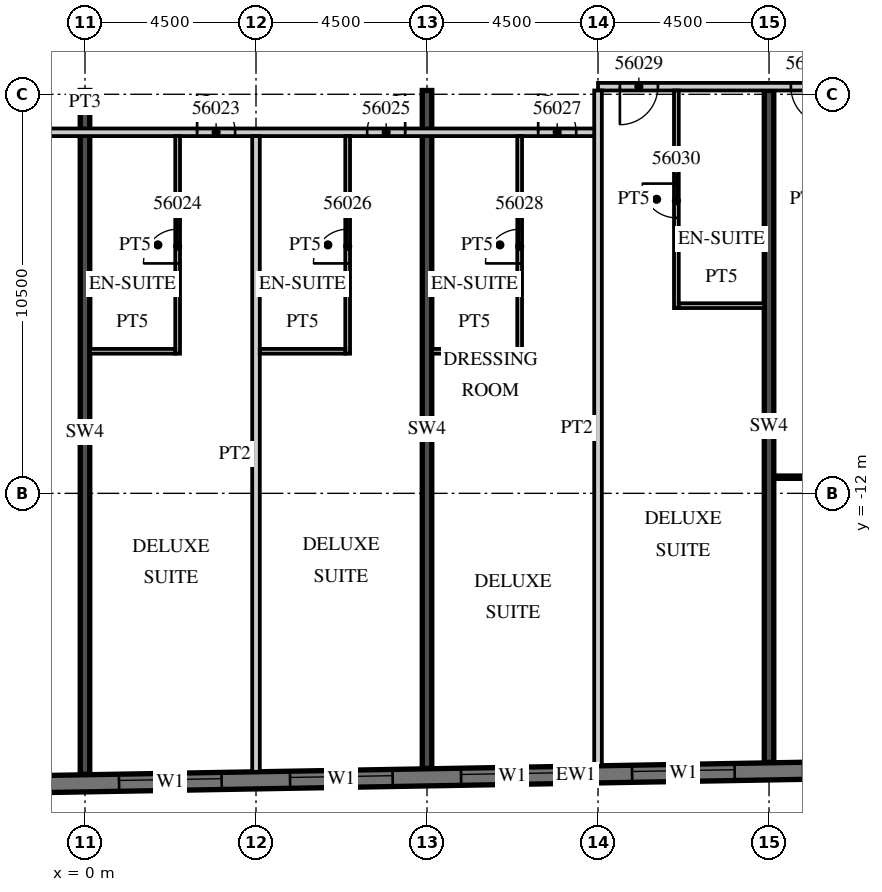
"""IFC4 building model, lengths in metres.
Left out: names, types, materials, properties, quantities, classifications, styles, units other than length and angle.
Written with IfcOpenShell. Run it as: python <this file> out.ifc"""

import sys

from ifc_helpers import new_model, si_unit, direction, frame, frame_2d, origin, place, context, subcontext, project, spatial, rectangle, extrude, element, fill, save


model = new_model("IFC4")
c1 = context("Model", 3, precision=1e-05, world=origin(), true_north=direction((0.0, 1.0)))
c2 = subcontext(c1, "Body", "Model", "MODEL_VIEW")
j1 = project(units=[si_unit("LENGTHUNIT", "METRE"), si_unit("PLANEANGLEUNIT", "RADIAN")], contexts=[c1])
p1 = place(None, origin())
s1 = spatial("IfcSite", under=j1, at=p1, CompositionType="ELEMENT")
p2 = place(p1, origin())
s2 = spatial("IfcBuilding", under=s1, at=p2, CompositionType="ELEMENT")
p3 = place(p2, frame((0.0, 0.0, 230.9)))
s3 = spatial("IfcBuildingStorey", under=s2, at=p3, CompositionType="ELEMENT", Elevation=230.9)
p4 = place(p3, frame((0.0, -19.393, 0.0), z_axis=(0.0, 0.0, 1.0), x_axis=(0.0, 1.0, 0.0)))
e1 = element("IfcWall", 1, at=p4, inside=s3, PredefinedType="SHEAR", context=c2, shape_type="SweptSolid", body=[
    extrude(rectangle(XDim=17.993, YDim=0.25, at=frame_2d((8.997, 0.0))), origin(), (0.0, 0.0, 1.0), 3.3),
])
p5 = place(p3, frame((9.0, -19.236, 0.0), z_axis=(0.0, 0.0, 1.0), x_axis=(0.0, 1.0, 0.0)))
e2 = element("IfcWall", 2, at=p5, inside=s3, PredefinedType="SHEAR", context=c2, shape_type="SweptSolid", body=[
    extrude(rectangle(XDim=17.836, YDim=0.25, at=frame_2d((8.918, 0.0))), origin(), (0.0, 0.0, 1.0), 3.3),
])
p6 = place(p3, frame((18.0, -19.079, 0.0), z_axis=(0.0, 0.0, 1.0), x_axis=(0.0, 1.0, 0.0)))
e3 = element("IfcWall", 3, at=p6, inside=s3, PredefinedType="SHEAR", context=c2, shape_type="SweptSolid", body=[
    extrude(rectangle(XDim=17.679, YDim=0.25, at=frame_2d((8.84, 0.0))), origin(), (0.0, 0.0, 1.0), 3.3),
])
p7 = place(p3, frame((-13.504, -19.866, 0.0), z_axis=(0.0, 0.0, 1.0), x_axis=(0.999847672978, 0.017453676992, 0.0)))
e4 = element("IfcWall", 4, at=p7, inside=s3, PredefinedType="SOLIDWALL", context=c2, shape_type="SweptSolid", body=[
    extrude(rectangle(XDim=52.86, YDim=0.45, at=frame_2d((26.43, 0.0))), origin(), (0.0, 0.0, 1.0), 3.02),
])
p8 = place(p7, frame((0.9, 0.0, 0.45)))
e5 = element("IfcOpeningElement", 5, at=p8, cuts=e4, PredefinedType="OPENING", context=c2, shape_type="SweptSolid", body=[
    extrude(rectangle(XDim=2.7, YDim=2.25, at=frame_2d((1.35, 1.125))), frame((0.0, 0.235, 0.0), z_axis=(0.0, -1.0, 0.0), x_axis=(1.0, 0.0, 0.0)), (0.0, 0.0, 1.0), 0.47),
])
p9 = place(p7, frame((5.401, 0.0, 0.45)))
e6 = element("IfcOpeningElement", 6, at=p9, cuts=e4, PredefinedType="OPENING", context=c2, shape_type="SweptSolid", body=[
    extrude(rectangle(XDim=2.7, YDim=2.25, at=frame_2d((1.35, 1.125))), frame((0.0, 0.235, 0.0), z_axis=(0.0, -1.0, 0.0), x_axis=(1.0, 0.0, 0.0)), (0.0, 0.0, 1.0), 0.47),
])
p10 = place(p7, frame((9.902, 0.0, 0.45)))
e7 = element("IfcOpeningElement", 7, at=p10, cuts=e4, PredefinedType="OPENING", context=c2, shape_type="SweptSolid", body=[
    extrude(rectangle(XDim=2.7, YDim=2.25, at=frame_2d((1.35, 1.125))), frame((0.0, 0.235, 0.0), z_axis=(0.0, -1.0, 0.0), x_axis=(1.0, 0.0, 0.0)), (0.0, 0.0, 1.0), 0.47),
])
p11 = place(p7, frame((14.402, 0.0, 0.45)))
e8 = element("IfcOpeningElement", 8, at=p11, cuts=e4, PredefinedType="OPENING", context=c2, shape_type="SweptSolid", body=[
    extrude(rectangle(XDim=2.7, YDim=2.25, at=frame_2d((1.35, 1.125))), frame((0.0, 0.235, 0.0), z_axis=(0.0, -1.0, 0.0), x_axis=(1.0, 0.0, 0.0)), (0.0, 0.0, 1.0), 0.47),
])
p12 = place(p7, frame((18.903, 0.0, 0.45)))
e9 = element("IfcOpeningElement", 9, at=p12, cuts=e4, PredefinedType="OPENING", context=c2, shape_type="SweptSolid", body=[
    extrude(rectangle(XDim=2.7, YDim=2.25, at=frame_2d((1.35, 1.125))), frame((0.0, 0.235, 0.0), z_axis=(0.0, -1.0, 0.0), x_axis=(1.0, 0.0, 0.0)), (0.0, 0.0, 1.0), 0.47),
])
p13 = place(p7, frame((23.404, 0.0, 0.45)))
e10 = element("IfcOpeningElement", 10, at=p13, cuts=e4, PredefinedType="OPENING", context=c2, shape_type="SweptSolid", body=[
    extrude(rectangle(XDim=2.7, YDim=2.25, at=frame_2d((1.35, 1.125))), frame((0.0, 0.235, 0.0), z_axis=(0.0, -1.0, 0.0), x_axis=(1.0, 0.0, 0.0)), (0.0, 0.0, 1.0), 0.47),
])
p14 = place(p7, frame((27.904, 0.0, 0.45)))
e11 = element("IfcOpeningElement", 11, at=p14, cuts=e4, PredefinedType="OPENING", context=c2, shape_type="SweptSolid", body=[
    extrude(rectangle(XDim=2.7, YDim=2.25, at=frame_2d((1.35, 1.125))), frame((0.0, 0.235, 0.0), z_axis=(0.0, -1.0, 0.0), x_axis=(1.0, 0.0, 0.0)), (0.0, 0.0, 1.0), 0.47),
])
p15 = place(p7, frame((32.405, 0.0, 0.45)))
e12 = element("IfcOpeningElement", 12, at=p15, cuts=e4, PredefinedType="OPENING", context=c2, shape_type="SweptSolid", body=[
    extrude(rectangle(XDim=2.7, YDim=2.25, at=frame_2d((1.35, 1.125))), frame((0.0, 0.235, 0.0), z_axis=(0.0, -1.0, 0.0), x_axis=(1.0, 0.0, 0.0)), (0.0, 0.0, 1.0), 0.47),
])
p16 = place(p7, frame((36.906, 0.0, 0.45)))
e13 = element("IfcOpeningElement", 13, at=p16, cuts=e4, PredefinedType="OPENING", context=c2, shape_type="SweptSolid", body=[
    extrude(rectangle(XDim=2.7, YDim=2.25, at=frame_2d((1.35, 1.125))), frame((0.0, 0.235, 0.0), z_axis=(0.0, -1.0, 0.0), x_axis=(1.0, 0.0, 0.0)), (0.0, 0.0, 1.0), 0.47),
])
p17 = place(p7, frame((41.406, 0.0, 0.45)))
e14 = element("IfcOpeningElement", 14, at=p17, cuts=e4, PredefinedType="OPENING", context=c2, shape_type="SweptSolid", body=[
    extrude(rectangle(XDim=2.7, YDim=2.25, at=frame_2d((1.35, 1.125))), frame((0.0, 0.235, 0.0), z_axis=(0.0, -1.0, 0.0), x_axis=(1.0, 0.0, 0.0)), (0.0, 0.0, 1.0), 0.47),
])
p18 = place(p7, frame((45.907, 0.0, 0.45)))
e15 = element("IfcOpeningElement", 15, at=p18, cuts=e4, PredefinedType="OPENING", context=c2, shape_type="SweptSolid", body=[
    extrude(rectangle(XDim=2.7, YDim=2.25, at=frame_2d((1.35, 1.125))), frame((0.0, 0.235, 0.0), z_axis=(0.0, -1.0, 0.0), x_axis=(1.0, 0.0, 0.0)), (0.0, 0.0, 1.0), 0.47),
])
p19 = place(p3, frame((-13.5, -2.5, 0.0), z_axis=(0.0, 0.0, 1.0), x_axis=(1.0, 0.0, 0.0)))
e16 = element("IfcWall", 16, at=p19, inside=s3, PredefinedType="PARTITIONING", context=c2, shape_type="SweptSolid", body=[
    extrude(rectangle(XDim=27.0, YDim=0.2, at=frame_2d((13.5, 0.0))), origin(), (0.0, 0.0, 1.0), 3.02),
])
p20 = place(p19, frame((2.925, 0.0, 0.0)))
e17 = element("IfcOpeningElement", 17, at=p20, cuts=e16, PredefinedType="OPENING", context=c2, shape_type="SweptSolid", body=[
    extrude(rectangle(XDim=1.0, YDim=2.1, at=frame_2d((0.5, 1.05))), frame((0.0, 0.11, 0.0), z_axis=(0.0, -1.0, 0.0), x_axis=(1.0, 0.0, 0.0)), (0.0, 0.0, 1.0), 0.22),
])
p21 = place(p19, frame((9.863, 0.0, 0.0)))
e18 = element("IfcOpeningElement", 18, at=p21, cuts=e16, PredefinedType="OPENING", context=c2, shape_type="SweptSolid", body=[
    extrude(rectangle(XDim=1.2, YDim=2.1, at=frame_2d((0.6, 1.05))), frame((0.0, 0.11, 0.0), z_axis=(0.0, -1.0, 0.0), x_axis=(1.0, 0.0, 0.0)), (0.0, 0.0, 1.0), 0.22),
])
p22 = place(p19, frame((16.45, 0.0, 0.0)))
e19 = element("IfcOpeningElement", 19, at=p22, cuts=e16, PredefinedType="OPENING", context=c2, shape_type="SweptSolid", body=[
    extrude(rectangle(XDim=1.0, YDim=2.1, at=frame_2d((0.5, 1.05))), frame((0.0, 0.11, 0.0), z_axis=(0.0, -1.0, 0.0), x_axis=(1.0, 0.0, 0.0)), (0.0, 0.0, 1.0), 0.22),
])
p23 = place(p19, frame((20.925, 0.0, 0.0)))
e20 = element("IfcOpeningElement", 20, at=p23, cuts=e16, PredefinedType="OPENING", context=c2, shape_type="SweptSolid", body=[
    extrude(rectangle(XDim=1.0, YDim=2.1, at=frame_2d((0.5, 1.05))), frame((0.0, 0.11, 0.0), z_axis=(0.0, -1.0, 0.0), x_axis=(1.0, 0.0, 0.0)), (0.0, 0.0, 1.0), 0.22),
])
p24 = place(p19, frame((25.425, 0.0, 0.0)))
e21 = element("IfcOpeningElement", 21, at=p24, cuts=e16, PredefinedType="OPENING", context=c2, shape_type="SweptSolid", body=[
    extrude(rectangle(XDim=1.0, YDim=2.1, at=frame_2d((0.5, 1.05))), frame((0.0, 0.11, 0.0), z_axis=(0.0, -1.0, 0.0), x_axis=(1.0, 0.0, 0.0)), (0.0, 0.0, 1.0), 0.22),
])
p25 = place(p3, frame((13.5, -1.3, 0.0), z_axis=(0.0, 0.0, 1.0), x_axis=(1.0, 0.0, 0.0)))
e22 = element("IfcWall", 22, at=p25, inside=s3, PredefinedType="PARTITIONING", context=c2, shape_type="SweptSolid", body=[
    extrude(rectangle(XDim=29.091, YDim=0.2, at=frame_2d((14.545, 0.0))), origin(), (0.0, 0.0, 1.0), 3.02),
])
p26 = place(p25, frame((0.575, 0.0, 0.0)))
e23 = element("IfcOpeningElement", 23, at=p26, cuts=e22, PredefinedType="OPENING", context=c2, shape_type="SweptSolid", body=[
    extrude(rectangle(XDim=1.0, YDim=2.1, at=frame_2d((0.5, 1.05))), frame((0.0, 0.11, 0.0), z_axis=(0.0, -1.0, 0.0), x_axis=(1.0, 0.0, 0.0)), (0.0, 0.0, 1.0), 0.22),
])
p27 = place(p25, frame((5.075, 0.0, 0.0)))
e24 = element("IfcOpeningElement", 24, at=p27, cuts=e22, PredefinedType="OPENING", context=c2, shape_type="SweptSolid", body=[
    extrude(rectangle(XDim=1.0, YDim=2.1, at=frame_2d((0.5, 1.05))), frame((0.0, 0.11, 0.0), z_axis=(0.0, -1.0, 0.0), x_axis=(1.0, 0.0, 0.0)), (0.0, 0.0, 1.0), 0.22),
])
p28 = place(p25, frame((9.55, 0.0, 0.0)))
e25 = element("IfcOpeningElement", 25, at=p28, cuts=e22, PredefinedType="OPENING", context=c2, shape_type="SweptSolid", body=[
    extrude(rectangle(XDim=1.0, YDim=2.1, at=frame_2d((0.5, 1.05))), frame((0.0, 0.11, 0.0), z_axis=(0.0, -1.0, 0.0), x_axis=(1.0, 0.0, 0.0)), (0.0, 0.0, 1.0), 0.22),
])
p29 = place(p25, frame((18.862, 0.0, 0.0)))
e26 = element("IfcOpeningElement", 26, at=p29, cuts=e22, PredefinedType="OPENING", context=c2, shape_type="SweptSolid", body=[
    extrude(rectangle(XDim=1.2, YDim=2.1, at=frame_2d((0.6, 1.05))), frame((0.0, 0.11, 0.0), z_axis=(0.0, -1.0, 0.0), x_axis=(1.0, 0.0, 0.0)), (0.0, 0.0, 1.0), 0.22),
])
p30 = place(p25, frame((23.075, 0.0, 0.0)))
e27 = element("IfcOpeningElement", 27, at=p30, cuts=e22, PredefinedType="OPENING", context=c2, shape_type="SweptSolid", body=[
    extrude(rectangle(XDim=1.0, YDim=2.1, at=frame_2d((0.5, 1.05))), frame((0.0, 0.11, 0.0), z_axis=(0.0, -1.0, 0.0), x_axis=(1.0, 0.0, 0.0)), (0.0, 0.0, 1.0), 0.22),
])
p31 = place(p25, frame((27.611, 0.0, 0.0)))
e28 = element("IfcOpeningElement", 28, at=p31, cuts=e22, PredefinedType="OPENING", context=c2, shape_type="SweptSolid", body=[
    extrude(rectangle(XDim=1.0, YDim=2.4, at=frame_2d((0.5, 1.2))), frame((0.0, 0.11, 0.0), z_axis=(0.0, -1.0, 0.0), x_axis=(1.0, 0.0, 0.0)), (0.0, 0.0, 1.0), 0.22),
])
p32 = place(p3, frame((4.5, -19.327, 0.0), z_axis=(0.0, 0.0, 1.0), x_axis=(0.0, 1.0, 0.0)))
e29 = element("IfcWall", 29, at=p32, inside=s3, PredefinedType="PARTITIONING", context=c2, shape_type="SweptSolid", body=[
    extrude(rectangle(XDim=16.727, YDim=0.2, at=frame_2d((8.363, 0.0))), origin(), (0.0, 0.0, 1.0), 3.02),
])
p33 = place(p3, frame((2.438, -8.325, 0.0), z_axis=(0.0, 0.0, 1.0), x_axis=(0.0, 1.0, 0.0)))
e30 = element("IfcWall", 30, at=p33, inside=s3, PredefinedType="PARTITIONING", context=c2, shape_type="SweptSolid", body=[
    extrude(rectangle(XDim=5.725, YDim=0.125, at=frame_2d((2.862, 0.0))), origin(), (0.0, 0.0, 1.0), 3.02),
])
p34 = place(p33, frame((2.375, 0.0, 0.0)))
e31 = element("IfcOpeningElement", 31, at=p34, cuts=e30, PredefinedType="OPENING", context=c2, shape_type="SweptSolid", body=[
    extrude(rectangle(XDim=0.9, YDim=2.1, at=frame_2d((0.45, 1.05))), frame((0.0, 0.073, 0.0), z_axis=(0.0, -1.0, 0.0), x_axis=(1.0, 0.0, 0.0)), (0.0, 0.0, 1.0), 0.145),
])
p35 = place(p3, frame((0.125, -8.262, 0.0), z_axis=(0.0, 0.0, 1.0), x_axis=(1.0, 0.0, 0.0)))
e32 = element("IfcWall", 32, at=p35, inside=s3, PredefinedType="PARTITIONING", context=c2, shape_type="SweptSolid", body=[
    extrude(rectangle(XDim=2.25, YDim=0.125, at=frame_2d((1.125, 0.0))), origin(), (0.0, 0.0, 1.0), 3.02),
])
p36 = place(p3, frame((6.912, -8.325, 0.0), z_axis=(0.0, 0.0, 1.0), x_axis=(0.0, 1.0, 0.0)))
e33 = element("IfcWall", 33, at=p36, inside=s3, PredefinedType="PARTITIONING", context=c2, shape_type="SweptSolid", body=[
    extrude(rectangle(XDim=5.725, YDim=0.125, at=frame_2d((2.862, 0.0))), origin(), (0.0, 0.0, 1.0), 3.02),
])
p37 = place(p36, frame((2.375, 0.0, 0.0)))
e34 = element("IfcOpeningElement", 34, at=p37, cuts=e33, PredefinedType="OPENING", context=c2, shape_type="SweptSolid", body=[
    extrude(rectangle(XDim=0.9, YDim=2.1, at=frame_2d((0.45, 1.05))), frame((0.0, 0.073, 0.0), z_axis=(0.0, -1.0, 0.0), x_axis=(1.0, 0.0, 0.0)), (0.0, 0.0, 1.0), 0.145),
])
p38 = place(p3, frame((4.6, -8.262, 0.0), z_axis=(0.0, 0.0, 1.0), x_axis=(1.0, 0.0, 0.0)))
e35 = element("IfcWall", 35, at=p38, inside=s3, PredefinedType="PARTITIONING", context=c2, shape_type="SweptSolid", body=[
    extrude(rectangle(XDim=2.25, YDim=0.125, at=frame_2d((1.125, 0.0))), origin(), (0.0, 0.0, 1.0), 3.02),
])
p39 = place(p3, frame((13.5, -19.17, 0.0), z_axis=(0.0, 0.0, 1.0), x_axis=(0.0, 1.0, 0.0)))
e36 = element("IfcWall", 36, at=p39, inside=s3, PredefinedType="PARTITIONING", context=c2, shape_type="SweptSolid", body=[
    extrude(rectangle(XDim=17.77, YDim=0.2, at=frame_2d((8.885, 0.0))), origin(), (0.0, 0.0, 1.0), 3.02),
])
p40 = place(p3, frame((11.438, -8.325, 0.0), z_axis=(0.0, 0.0, 1.0), x_axis=(0.0, 1.0, 0.0)))
e37 = element("IfcWall", 37, at=p40, inside=s3, PredefinedType="PARTITIONING", context=c2, shape_type="SweptSolid", body=[
    extrude(rectangle(XDim=5.725, YDim=0.125, at=frame_2d((2.862, 0.0))), origin(), (0.0, 0.0, 1.0), 3.02),
])
p41 = place(p40, frame((2.375, 0.0, 0.0)))
e38 = element("IfcOpeningElement", 38, at=p41, cuts=e37, PredefinedType="OPENING", context=c2, shape_type="SweptSolid", body=[
    extrude(rectangle(XDim=0.9, YDim=2.1, at=frame_2d((0.45, 1.05))), frame((0.0, 0.073, 0.0), z_axis=(0.0, -1.0, 0.0), x_axis=(1.0, 0.0, 0.0)), (0.0, 0.0, 1.0), 0.145),
])
p42 = place(p3, frame((9.125, -8.262, 0.0), z_axis=(0.0, 0.0, 1.0), x_axis=(1.0, 0.0, 0.0)))
e39 = element("IfcWall", 39, at=p42, inside=s3, PredefinedType="PARTITIONING", context=c2, shape_type="SweptSolid", body=[
    extrude(rectangle(XDim=2.25, YDim=0.125, at=frame_2d((1.125, 0.0))), origin(), (0.0, 0.0, 1.0), 3.02),
])
p43 = place(p3, frame((15.562, -7.125, 0.0), z_axis=(0.0, 0.0, 1.0), x_axis=(0.0, 1.0, 0.0)))
e40 = element("IfcWall", 40, at=p43, inside=s3, PredefinedType="PARTITIONING", context=c2, shape_type="SweptSolid", body=[
    extrude(rectangle(XDim=5.725, YDim=0.125, at=frame_2d((2.863, 0.0))), origin(), (0.0, 0.0, 1.0), 3.02),
])
p44 = place(p43, frame((2.375, 0.0, 0.0)))
e41 = element("IfcOpeningElement", 41, at=p44, cuts=e40, PredefinedType="OPENING", context=c2, shape_type="SweptSolid", body=[
    extrude(rectangle(XDim=0.9, YDim=2.1, at=frame_2d((0.45, 1.05))), frame((0.0, 0.073, 0.0), z_axis=(0.0, -1.0, 0.0), x_axis=(1.0, 0.0, 0.0)), (0.0, 0.0, 1.0), 0.145),
])
p45 = place(p3, frame((15.625, -7.062, 0.0), z_axis=(0.0, 0.0, 1.0), x_axis=(1.0, 0.0, 0.0)))
e42 = element("IfcWall", 42, at=p45, inside=s3, PredefinedType="PARTITIONING", context=c2, shape_type="SweptSolid", body=[
    extrude(rectangle(XDim=2.25, YDim=0.125, at=frame_2d((1.125, 0.0))), origin(), (0.0, 0.0, 1.0), 3.02),
])
p46 = place(p3, frame((18.125, -11.575, 0.0), z_axis=(0.0, 0.0, 1.0), x_axis=(1.0, 0.0, 0.0)))
e43 = element("IfcWall", 43, at=p46, inside=s3, PredefinedType="PARTITIONING", context=c2, shape_type="SweptSolid", body=[
    extrude(rectangle(XDim=4.275, YDim=0.1, at=frame_2d((2.137, 0.0))), origin(), (0.0, 0.0, 1.0), 3.02),
])
p47 = place(p46, frame((1.387, 0.0, 0.0)))
e44 = element("IfcOpeningElement", 44, at=p47, cuts=e43, PredefinedType="OPENING", context=c2, shape_type="SweptSolid", body=[
    extrude(rectangle(XDim=1.5, YDim=2.1, at=frame_2d((0.75, 1.05))), frame((0.0, 0.06, 0.0), z_axis=(0.0, -1.0, 0.0), x_axis=(1.0, 0.0, 0.0)), (0.0, 0.0, 1.0), 0.12),
])
p48 = place(p11, origin())
e45 = element("IfcWindow", 45, at=p48, inside=s3, PartitioningType="SINGLE_PANEL", PredefinedType="WINDOW", context=c2, shape_type="SweptSolid", body=[
    extrude(rectangle(XDim=2.7, YDim=2.25, at=frame_2d((1.35, 1.125))), frame((0.0, 0.09, 0.0), z_axis=(0.0, -1.0, 0.0), x_axis=(1.0, 0.0, 0.0)), (0.0, 0.0, 1.0), 0.06),
])
fill(e8, e45)
p49 = place(p12, origin())
e46 = element("IfcWindow", 46, at=p49, inside=s3, PartitioningType="SINGLE_PANEL", PredefinedType="WINDOW", context=c2, shape_type="SweptSolid", body=[
    extrude(rectangle(XDim=2.7, YDim=2.25, at=frame_2d((1.35, 1.125))), frame((0.0, 0.09, 0.0), z_axis=(0.0, -1.0, 0.0), x_axis=(1.0, 0.0, 0.0)), (0.0, 0.0, 1.0), 0.06),
])
fill(e9, e46)
p50 = place(p13, origin())
e47 = element("IfcWindow", 47, at=p50, inside=s3, PartitioningType="SINGLE_PANEL", PredefinedType="WINDOW", context=c2, shape_type="SweptSolid", body=[
    extrude(rectangle(XDim=2.7, YDim=2.25, at=frame_2d((1.35, 1.125))), frame((0.0, 0.09, 0.0), z_axis=(0.0, -1.0, 0.0), x_axis=(1.0, 0.0, 0.0)), (0.0, 0.0, 1.0), 0.06),
])
fill(e10, e47)
p51 = place(p14, origin())
e48 = element("IfcWindow", 48, at=p51, inside=s3, PartitioningType="SINGLE_PANEL", PredefinedType="WINDOW", context=c2, shape_type="SweptSolid", body=[
    extrude(rectangle(XDim=2.7, YDim=2.25, at=frame_2d((1.35, 1.125))), frame((0.0, 0.09, 0.0), z_axis=(0.0, -1.0, 0.0), x_axis=(1.0, 0.0, 0.0)), (0.0, 0.0, 1.0), 0.06),
])
fill(e11, e48)
p52 = place(p22, origin())
e49 = element("IfcDoor", 49, at=p52, inside=s3, OperationType="SINGLE_SWING_LEFT", PredefinedType="DOOR", context=c2, shape_type="SweptSolid", body=[
    extrude(rectangle(XDim=1.0, YDim=2.1, at=frame_2d((0.5, 1.05))), frame((0.0, 0.025, 0.0), z_axis=(0.0, -1.0, 0.0), x_axis=(1.0, 0.0, 0.0)), (0.0, 0.0, 1.0), 0.05),
])
fill(e19, e49)
p53 = place(p34, origin())
e50 = element("IfcDoor", 50, at=p53, inside=s3, OperationType="SINGLE_SWING_LEFT", PredefinedType="DOOR", context=c2, shape_type="SweptSolid", body=[
    extrude(rectangle(XDim=0.9, YDim=2.1, at=frame_2d((0.45, 1.05))), frame((0.0, 0.025, 0.0), z_axis=(0.0, -1.0, 0.0), x_axis=(1.0, 0.0, 0.0)), (0.0, 0.0, 1.0), 0.05),
])
fill(e31, e50)
p54 = place(p23, origin())
e51 = element("IfcDoor", 51, at=p54, inside=s3, OperationType="SINGLE_SWING_RIGHT", PredefinedType="DOOR", context=c2, shape_type="SweptSolid", body=[
    extrude(rectangle(XDim=1.0, YDim=2.1, at=frame_2d((0.5, 1.05))), frame((0.0, 0.025, 0.0), z_axis=(0.0, -1.0, 0.0), x_axis=(1.0, 0.0, 0.0)), (0.0, 0.0, 1.0), 0.05),
])
fill(e20, e51)
p55 = place(p37, origin())
e52 = element("IfcDoor", 52, at=p55, inside=s3, OperationType="SINGLE_SWING_LEFT", PredefinedType="DOOR", context=c2, shape_type="SweptSolid", body=[
    extrude(rectangle(XDim=0.9, YDim=2.1, at=frame_2d((0.45, 1.05))), frame((0.0, 0.025, 0.0), z_axis=(0.0, -1.0, 0.0), x_axis=(1.0, 0.0, 0.0)), (0.0, 0.0, 1.0), 0.05),
])
fill(e34, e52)
p56 = place(p24, origin())
e53 = element("IfcDoor", 53, at=p56, inside=s3, OperationType="SINGLE_SWING_LEFT", PredefinedType="DOOR", context=c2, shape_type="SweptSolid", body=[
    extrude(rectangle(XDim=1.0, YDim=2.1, at=frame_2d((0.5, 1.05))), frame((0.0, 0.025, 0.0), z_axis=(0.0, -1.0, 0.0), x_axis=(1.0, 0.0, 0.0)), (0.0, 0.0, 1.0), 0.05),
])
fill(e21, e53)
p57 = place(p41, origin())
e54 = element("IfcDoor", 54, at=p57, inside=s3, OperationType="SINGLE_SWING_LEFT", PredefinedType="DOOR", context=c2, shape_type="SweptSolid", body=[
    extrude(rectangle(XDim=0.9, YDim=2.1, at=frame_2d((0.45, 1.05))), frame((0.0, 0.025, 0.0), z_axis=(0.0, -1.0, 0.0), x_axis=(1.0, 0.0, 0.0)), (0.0, 0.0, 1.0), 0.05),
])
fill(e38, e54)
p58 = place(p26, origin())
e55 = element("IfcDoor", 55, at=p58, inside=s3, OperationType="SINGLE_SWING_LEFT", PredefinedType="DOOR", context=c2, shape_type="SweptSolid", body=[
    extrude(rectangle(XDim=1.0, YDim=2.1, at=frame_2d((0.5, 1.05))), frame((0.0, 0.025, 0.0), z_axis=(0.0, -1.0, 0.0), x_axis=(1.0, 0.0, 0.0)), (0.0, 0.0, 1.0), 0.05),
])
fill(e23, e55)
p59 = place(p44, origin())
e56 = element("IfcDoor", 56, at=p59, inside=s3, OperationType="SINGLE_SWING_RIGHT", PredefinedType="DOOR", context=c2, shape_type="SweptSolid", body=[
    extrude(rectangle(XDim=0.9, YDim=2.1, at=frame_2d((0.45, 1.05))), frame((0.0, 0.025, 0.0), z_axis=(0.0, -1.0, 0.0), x_axis=(1.0, 0.0, 0.0)), (0.0, 0.0, 1.0), 0.05),
])
fill(e41, e56)
p60 = place(p27, origin())
e57 = element("IfcDoor", 57, at=p60, inside=s3, OperationType="SINGLE_SWING_RIGHT", PredefinedType="DOOR", context=c2, shape_type="SweptSolid", body=[
    extrude(rectangle(XDim=1.0, YDim=2.1, at=frame_2d((0.5, 1.05))), frame((0.0, 0.025, 0.0), z_axis=(0.0, -1.0, 0.0), x_axis=(1.0, 0.0, 0.0)), (0.0, 0.0, 1.0), 0.05),
])
fill(e24, e57)
save(model, sys.argv[1])
